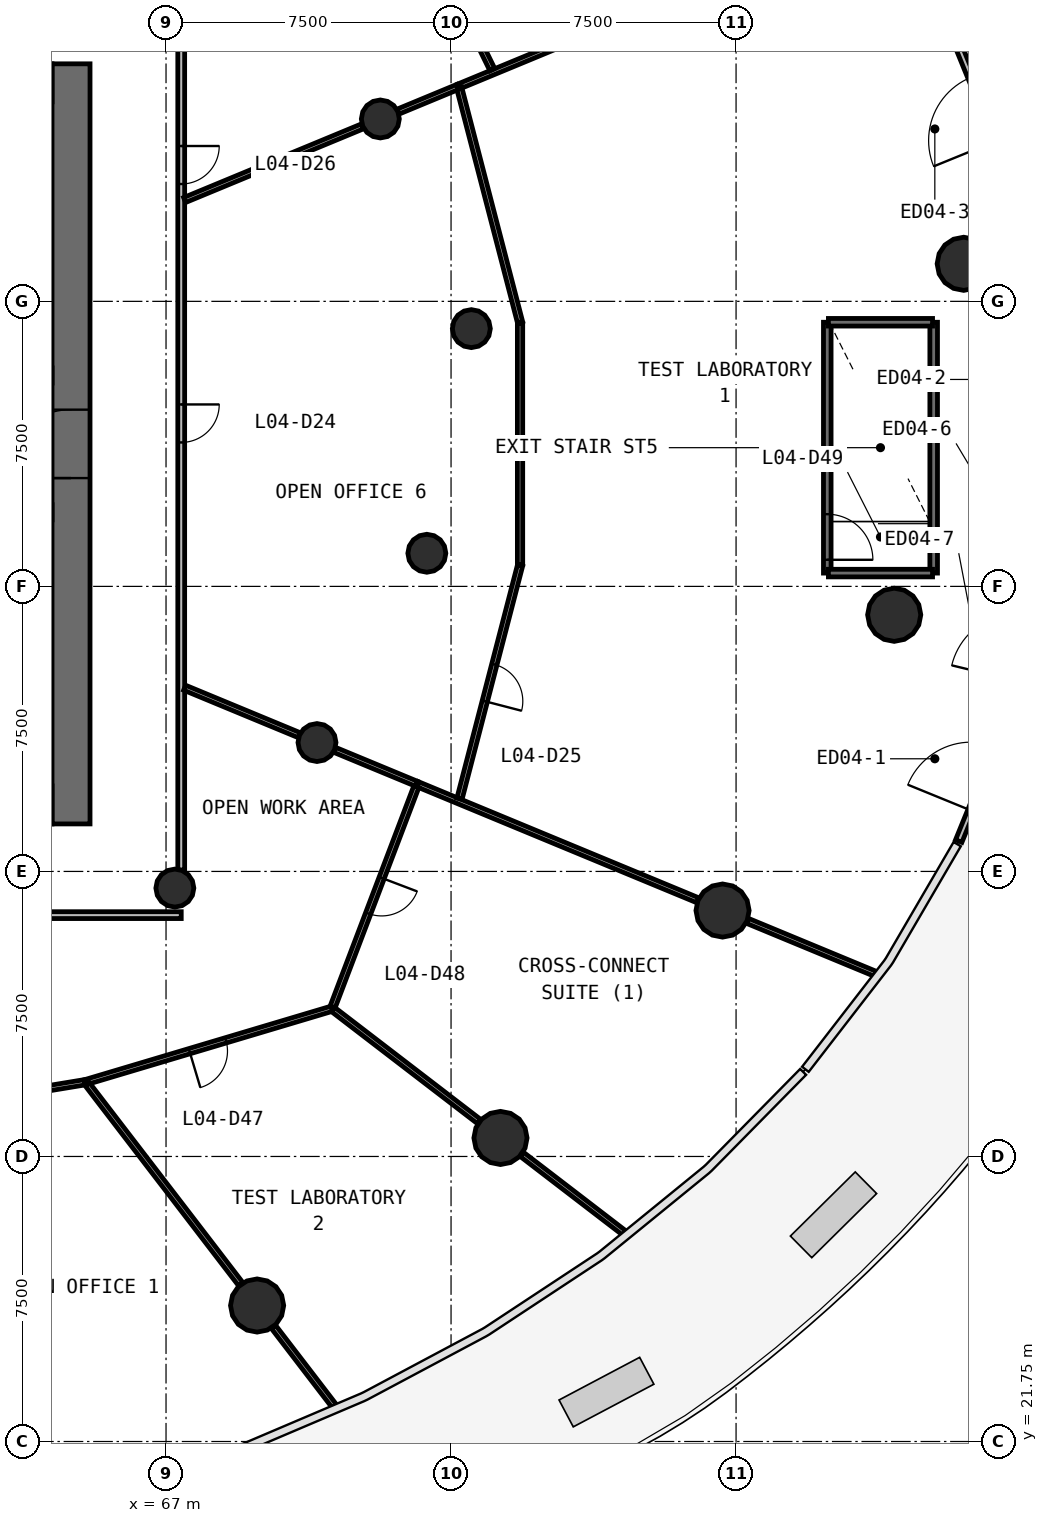
"""IFC4 building model, lengths in metres.
Left out: names, types, materials, properties, quantities, classifications, styles, units other than length and angle.
Written with IfcOpenShell. Run it as: python <this file> out.ifc"""

import sys

from ifc_helpers import new_model, si_unit, direction, frame, frame_2d, origin, origin_2d, place, context, subcontext, project, spatial, rectangle, circle, extrude, source, transform, mapped, element, fill, save


model = new_model("IFC4")
c1 = context("Model", 3, precision=1e-05, world=origin(), true_north=direction((0.0, 1.0)))
c2 = subcontext(c1, "Body", "Model", "MODEL_VIEW")
j1 = project(units=[si_unit("LENGTHUNIT", "METRE"), si_unit("PLANEANGLEUNIT", "RADIAN")], contexts=[c1])
p1 = place(None, origin())
s1 = spatial("IfcSite", under=j1, at=p1, CompositionType="ELEMENT")
p2 = place(p1, origin())
s2 = spatial("IfcBuilding", under=s1, at=p2, CompositionType="ELEMENT")
p3 = place(p2, frame((0.0, 0.0, 18.2)))
s3 = spatial("IfcBuildingStorey", under=s2, at=p3, CompositionType="ELEMENT", Elevation=18.2)
p4 = place(p3, frame((64.5, 38.0, 0.0), z_axis=(0.0, 0.0, 1.0), x_axis=(0.0, 1.0, 0.0)))
e1 = element("IfcWall", 1, at=p4, inside=s3, PredefinedType="SHEAR", context=c2, shape_type="SweptSolid", body=[
    extrude(rectangle(XDim=20.0, YDim=1.0, at=frame_2d((10.0, 0.0))), origin(), (0.0, 0.0, 1.0), 4.4),
])
p5 = place(p4, frame((9.1, 0.0, 0.0)))
e2 = element("IfcOpeningElement", 2, at=p5, cuts=e1, PredefinedType="OPENING", context=c2, shape_type="SweptSolid", body=[
    extrude(rectangle(XDim=1.8, YDim=2.1, at=frame_2d((0.9, 1.05))), frame((0.0, 0.51, 0.0), z_axis=(0.0, -1.0, 0.0), x_axis=(1.0, 0.0, 0.0)), (0.0, 0.0, 1.0), 1.02),
])
m1 = source(origin(), c2, "Body", "SweptSolid", [
    extrude(circle(Radius=0.7, at=origin_2d()), origin(), (0.0, 0.0, 1.0), 4.4),
])
for number, where, z_axis, x_axis in (
    (3, (87.99, 52.738, 0.0), (0.0, 0.0, 1.0), (1.0, 0.0, 0.0)),
    (4, (69.396, 25.328, 0.0), (0.0, 0.0, 1.0), (1.0, 0.0, 0.0)),
    (5, (75.801, 29.737, 0.0), (0.0, 0.0, 1.0), (1.0, 0.0, 0.0)),
    (6, (81.645, 35.721, 0.0), (0.0, 0.0, 1.0), (1.0, 0.0, 0.0)),
    (7, (86.161, 43.503, 0.0), (0.0, 0.0, 1.0), (1.0, 0.0, 0.0)),
):
    element("IfcColumn", number, at=place(p3, frame(where, z_axis=z_axis, x_axis=x_axis)), inside=s3, PredefinedType="COLUMN", context=c2, shape_type="MappedRepresentation", body=[
        mapped(m1, transform((0.0, 0.0, 0.0), scale=1.0)),
    ])
m2 = source(origin(), c2, "Body", "SweptSolid", [
    extrude(circle(Radius=0.5, at=origin_2d()), origin(), (0.0, 0.0, 1.0), 4.4),
])
for number, where, z_axis, x_axis in (
    (8, (75.034, 51.032, 0.0), (0.0, 0.0, 1.0), (1.0, 0.0, 0.0)),
    (9, (72.639, 56.549, 0.0), (0.0, 0.0, 1.0), (1.0, 0.0, 0.0)),
    (10, (67.232, 36.312, 0.0), (0.0, 0.0, 1.0), (1.0, 0.0, 0.0)),
    (11, (70.972, 40.141, 0.0), (0.0, 0.0, 1.0), (1.0, 0.0, 0.0)),
    (12, (73.863, 45.122, 0.0), (0.0, 0.0, 1.0), (1.0, 0.0, 0.0)),
):
    element("IfcColumn", number, at=place(p3, frame(where, z_axis=z_axis, x_axis=x_axis)), inside=s3, PredefinedType="COLUMN", context=c2, shape_type="MappedRepresentation", body=[
        mapped(m2, transform((0.0, 0.0, 0.0), scale=1.0)),
    ])
p6 = place(p3, frame((89.194, 55.178, 0.0), z_axis=(0.0, 0.0, 1.0), x_axis=(-0.377704890436, 0.925926031463, 0.0)))
e13 = element("IfcWall", 13, at=p6, inside=s3, PredefinedType="STANDARD", context=c2, shape_type="SweptSolid", body=[
    extrude(rectangle(XDim=3.535, YDim=0.18, at=frame_2d((1.768, 0.0))), origin(), (0.0, 0.0, 1.0), 3.95),
])
p7 = place(p6, frame((0.867, 0.0, 0.0)))
e14 = element("IfcOpeningElement", 14, at=p7, cuts=e13, PredefinedType="OPENING", context=c2, shape_type="SweptSolid", body=[
    extrude(rectangle(XDim=1.8, YDim=2.4, at=frame_2d((0.9, 1.2))), frame((0.0, 0.1, 0.0), z_axis=(0.0, -1.0, 0.0), x_axis=(1.0, 0.0, 0.0)), (0.0, 0.0, 1.0), 0.2),
])
p8 = place(p3, frame((87.859, 37.549, 0.0), z_axis=(0.0, 0.0, 1.0), x_axis=(0.377704890436, 0.925926031463, 0.0)))
e15 = element("IfcWall", 15, at=p8, inside=s3, PredefinedType="STANDARD", context=c2, shape_type="SweptSolid", body=[
    extrude(rectangle(XDim=3.535, YDim=0.18, at=frame_2d((1.768, 0.0))), origin(), (0.0, 0.0, 1.0), 3.95),
])
p9 = place(p8, frame((0.867, 0.0, 0.0)))
e16 = element("IfcOpeningElement", 16, at=p9, cuts=e15, PredefinedType="OPENING", context=c2, shape_type="SweptSolid", body=[
    extrude(rectangle(XDim=1.8, YDim=2.4, at=frame_2d((0.9, 1.2))), frame((0.0, 0.1, 0.0), z_axis=(0.0, -1.0, 0.0), x_axis=(1.0, 0.0, 0.0)), (0.0, 0.0, 1.0), 0.2),
])
p10 = place(p3, frame((87.2, 44.6, 0.0), z_axis=(0.0, 0.0, 1.0), x_axis=(0.0, 1.0, 0.0)))
e17 = element("IfcWall", 17, at=p10, inside=s3, PredefinedType="SOLIDWALL", context=c2, shape_type="SweptSolid", body=[
    extrude(rectangle(XDim=6.6, YDim=0.2, at=frame_2d((3.3, 0.0))), origin(), (0.0, 0.0, 1.0), 3.95),
])
p11 = place(p3, frame((84.4, 51.2, 0.0), z_axis=(0.0, 0.0, 1.0), x_axis=(0.0, -1.0, 0.0)))
e18 = element("IfcWall", 18, at=p11, inside=s3, PredefinedType="SOLIDWALL", context=c2, shape_type="SweptSolid", body=[
    extrude(rectangle(XDim=6.6, YDim=0.2, at=frame_2d((3.3, 0.0))), origin(), (0.0, 0.0, 1.0), 3.95),
])
p12 = place(p11, frame((5.05, 0.0, 0.0)))
e19 = element("IfcOpeningElement", 19, at=p12, cuts=e18, PredefinedType="OPENING", context=c2, shape_type="SweptSolid", body=[
    extrude(rectangle(XDim=1.2, YDim=2.1, at=frame_2d((0.6, 1.05))), frame((0.0, 0.11, 0.0), z_axis=(0.0, -1.0, 0.0), x_axis=(1.0, 0.0, 0.0)), (0.0, 0.0, 1.0), 0.22),
])
for number, where, z_axis, x_axis in (
    (20, (84.43, 44.6, 0.0), (0.0, 0.0, 1.0), (1.0, 0.0, 0.0)),
    (21, (87.17, 51.2, 0.0), (0.0, 0.0, 1.0), (-1.0, 0.0, 0.0)),
):
    element("IfcWall", number, at=place(p3, frame(where, z_axis=z_axis, x_axis=x_axis)), inside=s3, PredefinedType="SOLIDWALL", context=c2, shape_type="SweptSolid", body=[
        extrude(rectangle(XDim=2.74, YDim=0.2, at=frame_2d((1.37, 0.0))), origin(), (0.0, 0.0, 1.0), 3.95),
    ])
p13 = place(p3, frame((67.4, 35.6, 0.0), z_axis=(0.0, 0.0, 1.0), x_axis=(-1.0, 0.0, 0.0)))
e22 = element("IfcWall", 22, at=p13, inside=s3, PredefinedType="PARTITIONING", context=c2, shape_type="SweptSolid", body=[
    extrude(rectangle(XDim=30.8, YDim=0.18, at=frame_2d((15.4, 0.0))), origin(), (0.0, 0.0, 1.0), 3.15),
])
p14 = place(p13, frame((25.55, 0.0, 0.0)))
e23 = element("IfcOpeningElement", 23, at=p14, cuts=e22, PredefinedType="OPENING", context=c2, shape_type="SweptSolid", body=[
    extrude(rectangle(XDim=1.0, YDim=2.1, at=frame_2d((0.5, 1.05))), frame((0.0, 0.1, 0.0), z_axis=(0.0, -1.0, 0.0), x_axis=(1.0, 0.0, 0.0)), (0.0, 0.0, 1.0), 0.2),
])
p15 = place(p13, frame((14.95, 0.0, 0.0)))
e24 = element("IfcOpeningElement", 24, at=p15, cuts=e22, PredefinedType="OPENING", context=c2, shape_type="SweptSolid", body=[
    extrude(rectangle(XDim=1.0, YDim=2.1, at=frame_2d((0.5, 1.05))), frame((0.0, 0.1, 0.0), z_axis=(0.0, -1.0, 0.0), x_axis=(1.0, 0.0, 0.0)), (0.0, 0.0, 1.0), 0.2),
])
p16 = place(p13, frame((8.95, 0.0, 0.0)))
e25 = element("IfcOpeningElement", 25, at=p16, cuts=e22, PredefinedType="OPENING", context=c2, shape_type="SweptSolid", body=[
    extrude(rectangle(XDim=1.0, YDim=2.1, at=frame_2d((0.5, 1.05))), frame((0.0, 0.1, 0.0), z_axis=(0.0, -1.0, 0.0), x_axis=(1.0, 0.0, 0.0)), (0.0, 0.0, 1.0), 0.2),
])
p17 = place(p3, frame((67.4, 60.37, 0.0), z_axis=(0.0, 0.0, 1.0), x_axis=(0.0, -1.0, 0.0)))
e26 = element("IfcWall", 26, at=p17, inside=s3, PredefinedType="PARTITIONING", context=c2, shape_type="SweptSolid", body=[
    extrude(rectangle(XDim=23.583, YDim=0.18, at=frame_2d((11.791, 0.0))), origin(), (0.0, 0.0, 1.0), 3.15),
])
p18 = place(p17, frame((11.333, 0.0, 0.0)))
e27 = element("IfcOpeningElement", 27, at=p18, cuts=e26, PredefinedType="OPENING", context=c2, shape_type="SweptSolid", body=[
    extrude(rectangle(XDim=1.0, YDim=2.1, at=frame_2d((0.5, 1.05))), frame((0.0, 0.1, 0.0), z_axis=(0.0, -1.0, 0.0), x_axis=(1.0, 0.0, 0.0)), (0.0, 0.0, 1.0), 0.2),
])
p19 = place(p17, frame((4.532, 0.0, 0.0)))
e28 = element("IfcOpeningElement", 28, at=p19, cuts=e26, PredefinedType="OPENING", context=c2, shape_type="SweptSolid", body=[
    extrude(rectangle(XDim=1.0, YDim=2.1, at=frame_2d((0.5, 1.05))), frame((0.0, 0.1, 0.0), z_axis=(0.0, -1.0, 0.0), x_axis=(1.0, 0.0, 0.0)), (0.0, 0.0, 1.0), 0.2),
])
p20 = place(p3, frame((74.704, 57.404, 0.0), z_axis=(0.0, 0.0, 1.0), x_axis=(0.923875564014, 0.382693013024, 0.0)))
e29 = element("IfcWall", 29, at=p20, inside=s3, PredefinedType="PARTITIONING", context=c2, shape_type="SweptSolid", body=[
    extrude(rectangle(XDim=9.626, YDim=0.14, at=frame_2d((4.813, 0.0))), origin(), (0.0, 0.0, 1.0), 3.15),
])
p21 = place(p3, frame((73.613, 39.048, 0.0), z_axis=(0.0, 0.0, 1.0), x_axis=(0.923869702123, -0.382707164159, 0.0)))
e30 = element("IfcWall", 30, at=p21, inside=s3, PredefinedType="PARTITIONING", context=c2, shape_type="SweptSolid", body=[
    extrude(rectangle(XDim=7.989, YDim=0.14, at=frame_2d((3.994, 0.0))), origin(), (0.0, 0.0, 1.0), 3.15),
])
p22 = place(p3, frame((71.367, 33.139, 0.0), z_axis=(0.0, 0.0, 1.0), x_axis=(-0.958287066923, -0.285807448063, 0.0)))
e31 = element("IfcWall", 31, at=p22, inside=s3, PredefinedType="PARTITIONING", context=c2, shape_type="SweptSolid", body=[
    extrude(rectangle(XDim=6.763, YDim=0.14, at=frame_2d((3.381, 0.0))), origin(), (0.0, 0.0, 1.0), 3.15),
])
p23 = place(p22, frame((2.913, 0.0, 0.0)))
e32 = element("IfcOpeningElement", 32, at=p23, cuts=e31, PredefinedType="OPENING", context=c2, shape_type="SweptSolid", body=[
    extrude(rectangle(XDim=1.0, YDim=2.1, at=frame_2d((0.5, 1.05))), frame((0.0, 0.08, 0.0), z_axis=(0.0, -1.0, 0.0), x_axis=(1.0, 0.0, 0.0)), (0.0, 0.0, 1.0), 0.16),
])
p24 = place(p3, frame((72.66, 63.816, 0.0), z_axis=(0.0, 0.0, 1.0), x_axis=(0.44010555344, -0.897946046169, 0.0)))
e33 = element("IfcWall", 33, at=p24, inside=s3, PredefinedType="PARTITIONING", context=c2, shape_type="SweptSolid", body=[
    extrude(rectangle(XDim=6.649, YDim=0.14, at=frame_2d((3.324, 0.0))), origin(), (0.0, 0.0, 1.0), 3.15),
])
p25 = place(p24, frame((2.799, 0.0, 0.0)))
e34 = element("IfcOpeningElement", 34, at=p25, cuts=e33, PredefinedType="OPENING", context=c2, shape_type="SweptSolid", body=[
    extrude(rectangle(XDim=1.0, YDim=2.1, at=frame_2d((0.5, 1.05))), frame((0.0, 0.08, 0.0), z_axis=(0.0, -1.0, 0.0), x_axis=(1.0, 0.0, 0.0)), (0.0, 0.0, 1.0), 0.16),
])
p26 = place(p3, frame((64.932, 31.147, 0.0), z_axis=(0.0, 0.0, 1.0), x_axis=(0.608760039418, -0.79335440656, 0.0)))
e35 = element("IfcWall", 35, at=p26, inside=s3, PredefinedType="PARTITIONING", context=c2, shape_type="SweptSolid", body=[
    extrude(rectangle(XDim=6.63, YDim=0.14, at=frame_2d((3.315, 0.0))), origin(), (0.0, 0.0, 1.0), 3.15),
])
p27 = place(p3, frame((76.316, 51.201, 0.0), z_axis=(0.0, 0.0, 1.0), x_axis=(-0.251404417417, 0.967882130687, 0.0)))
e36 = element("IfcWall", 36, at=p27, inside=s3, PredefinedType="PARTITIONING", context=c2, shape_type="SweptSolid", body=[
    extrude(rectangle(XDim=6.379, YDim=0.14, at=frame_2d((3.189, 0.0))), origin(), (0.0, 0.0, 1.0), 3.15),
])
p28 = place(p3, frame((76.316, 44.799, 0.0), z_axis=(0.0, 0.0, 1.0), x_axis=(-0.251407268144, -0.967881390215, 0.0)))
e37 = element("IfcWall", 37, at=p28, inside=s3, PredefinedType="PARTITIONING", context=c2, shape_type="SweptSolid", body=[
    extrude(rectangle(XDim=6.338, YDim=0.14, at=frame_2d((3.169, 0.0))), origin(), (0.0, 0.0, 1.0), 3.15),
])
p29 = place(p28, frame((2.688, 0.0, 0.0)))
e38 = element("IfcOpeningElement", 38, at=p29, cuts=e37, PredefinedType="OPENING", context=c2, shape_type="SweptSolid", body=[
    extrude(rectangle(XDim=1.0, YDim=2.1, at=frame_2d((0.5, 1.05))), frame((0.0, 0.08, 0.0), z_axis=(0.0, -1.0, 0.0), x_axis=(1.0, 0.0, 0.0)), (0.0, 0.0, 1.0), 0.16),
])
p30 = place(p3, frame((76.316, 44.829, 0.0), z_axis=(0.0, 0.0, 1.0), x_axis=(0.0, 1.0, 0.0)))
e39 = element("IfcWall", 39, at=p30, inside=s3, PredefinedType="PARTITIONING", context=c2, shape_type="SweptSolid", body=[
    extrude(rectangle(XDim=6.342, YDim=0.14, at=frame_2d((3.171, 0.0))), origin(), (0.0, 0.0, 1.0), 3.15),
])
p31 = place(p3, frame((73.588, 38.982, 0.0), z_axis=(0.0, 0.0, 1.0), x_axis=(-0.355244508987, -0.934773415772, 0.0)))
e40 = element("IfcWall", 40, at=p31, inside=s3, PredefinedType="PARTITIONING", context=c2, shape_type="SweptSolid", body=[
    extrude(rectangle(XDim=6.221, YDim=0.14, at=frame_2d((3.11, 0.0))), origin(), (0.0, 0.0, 1.0), 3.15),
])
p32 = place(p31, frame((2.571, 0.0, 0.0)))
e41 = element("IfcOpeningElement", 41, at=p32, cuts=e40, PredefinedType="OPENING", context=c2, shape_type="SweptSolid", body=[
    extrude(rectangle(XDim=1.0, YDim=2.1, at=frame_2d((0.5, 1.05))), frame((0.0, 0.08, 0.0), z_axis=(0.0, -1.0, 0.0), x_axis=(1.0, 0.0, 0.0)), (0.0, 0.0, 1.0), 0.16),
])
p33 = place(p3, frame((64.857, 31.201, 0.0), z_axis=(0.0, 0.0, 1.0), x_axis=(-0.986684787107, -0.162644184928, 0.0)))
e42 = element("IfcWall", 42, at=p33, inside=s3, PredefinedType="PARTITIONING", context=c2, shape_type="SweptSolid", body=[
    extrude(rectangle(XDim=5.596, YDim=0.14, at=frame_2d((2.798, 0.0))), origin(), (0.0, 0.0, 1.0), 3.15),
])
p34 = place(p33, frame((2.346, 0.0, 0.0)))
e43 = element("IfcOpeningElement", 43, at=p34, cuts=e42, PredefinedType="OPENING", context=c2, shape_type="SweptSolid", body=[
    extrude(rectangle(XDim=1.0, YDim=2.1, at=frame_2d((0.5, 1.05))), frame((0.0, 0.08, 0.0), z_axis=(0.0, -1.0, 0.0), x_axis=(1.0, 0.0, 0.0)), (0.0, 0.0, 1.0), 0.16),
])
p35 = place(p3, frame((67.49, 54.416, 0.0), z_axis=(0.0, 0.0, 1.0), x_axis=(0.923890025086, 0.382658100067, 0.0)))
e44 = element("IfcWall", 44, at=p35, inside=s3, PredefinedType="PARTITIONING", context=c2, shape_type="SweptSolid", body=[
    extrude(rectangle(XDim=5.068, YDim=0.14, at=frame_2d((2.534, 0.0))), origin(), (0.0, 0.0, 1.0), 3.15),
])
p36 = place(p3, frame((71.391, 33.121, 0.0), z_axis=(0.0, 0.0, 1.0), x_axis=(0.79336750658, -0.608742966697, 0.0)))
e45 = element("IfcWall", 45, at=p36, inside=s3, PredefinedType="PARTITIONING", context=c2, shape_type="SweptSolid", body=[
    extrude(rectangle(XDim=4.854, YDim=0.14, at=frame_2d((2.427, 0.0))), origin(), (0.0, 0.0, 1.0), 3.15),
])
p37 = place(p3, frame((82.296, 35.451, 0.0), z_axis=(0.0, 0.0, 1.0), x_axis=(0.923882033439, -0.382677394537, 0.0)))
e46 = element("IfcWall", 46, at=p37, inside=s3, PredefinedType="PARTITIONING", context=c2, shape_type="SweptSolid", body=[
    extrude(rectangle(XDim=3.642, YDim=0.14, at=frame_2d((1.821, 0.0))), origin(), (0.0, 0.0, 1.0), 3.15),
])
p38 = place(p3, frame((71.439, 39.948, 0.0), z_axis=(0.0, 0.0, 1.0), x_axis=(0.923861804277, -0.382726229306, 0.0)))
e47 = element("IfcWall", 47, at=p38, inside=s3, PredefinedType="PARTITIONING", context=c2, shape_type="SweptSolid", body=[
    extrude(rectangle(XDim=2.323, YDim=0.14, at=frame_2d((1.161, 0.0))), origin(), (0.0, 0.0, 1.0), 3.15),
])
p39 = place(p3, frame((76.359, 29.309, 0.0), z_axis=(0.0, 0.0, 1.0), x_axis=(0.793324630829, -0.608798842082, 0.0)))
e48 = element("IfcWall", 48, at=p39, inside=s3, PredefinedType="PARTITIONING", context=c2, shape_type="SweptSolid", body=[
    extrude(rectangle(XDim=3.404, YDim=0.14, at=frame_2d((1.702, 0.0))), origin(), (0.0, 0.0, 1.0), 3.15),
])
p40 = place(p3, frame((67.49, 41.584, 0.0), z_axis=(0.0, 0.0, 1.0), x_axis=(0.923911109142, -0.382607190737, 0.0)))
e49 = element("IfcWall", 49, at=p40, inside=s3, PredefinedType="PARTITIONING", context=c2, shape_type="SweptSolid", body=[
    extrude(rectangle(XDim=3.264, YDim=0.14, at=frame_2d((1.632, 0.0))), origin(), (0.0, 0.0, 1.0), 3.15),
])
p41 = place(p3, frame((73.106, 56.742, 0.0), z_axis=(0.0, 0.0, 1.0), x_axis=(0.923810256597, 0.38285063642, 0.0)))
e50 = element("IfcWall", 50, at=p41, inside=s3, PredefinedType="PARTITIONING", context=c2, shape_type="SweptSolid", body=[
    extrude(rectangle(XDim=1.7, YDim=0.14, at=frame_2d((0.85, 0.0))), origin(), (0.0, 0.0, 1.0), 3.15),
])
p42 = place(p3, frame((69.825, 24.77, 0.0), z_axis=(0.0, 0.0, 1.0), x_axis=(0.608811983243, -0.793314546104, 0.0)))
e51 = element("IfcWall", 51, at=p42, inside=s3, PredefinedType="PARTITIONING", context=c2, shape_type="SweptSolid", body=[
    extrude(rectangle(XDim=2.627, YDim=0.14, at=frame_2d((1.313, 0.0))), origin(), (0.0, 0.0, 1.0), 3.15),
])
m3 = source(origin(), c2, "Body", "SweptSolid", [
    extrude(rectangle(XDim=1.8, YDim=2.1, at=frame_2d((0.9, 1.05))), frame((0.0, 0.025, 0.0), z_axis=(0.0, -1.0, 0.0), x_axis=(1.0, 0.0, 0.0)), (0.0, 0.0, 1.0), 0.05),
])
p43 = place(p5, origin())
e52 = element("IfcDoor", 52, at=p43, inside=s3, OperationType="SINGLE_SWING_LEFT", PredefinedType="DOOR", context=c2, shape_type="MappedRepresentation", body=[
    mapped(m3, transform((0.0, 0.0, 0.0), scale=1.0)),
])
fill(e2, e52)
m4 = source(origin(), c2, "Body", "SweptSolid", [
    extrude(rectangle(XDim=1.0, YDim=2.1, at=frame_2d((0.5, 1.05))), frame((0.0, 0.025, 0.0), z_axis=(0.0, -1.0, 0.0), x_axis=(1.0, 0.0, 0.0)), (0.0, 0.0, 1.0), 0.05),
])
p44 = place(p18, origin())
e53 = element("IfcDoor", 53, at=p44, inside=s3, OperationType="SINGLE_SWING_LEFT", PredefinedType="DOOR", context=c2, shape_type="MappedRepresentation", body=[
    mapped(m4, transform((0.0, 0.0, 0.0), scale=1.0)),
])
fill(e27, e53)
p45 = place(p29, origin())
e54 = element("IfcDoor", 54, at=p45, inside=s3, OperationType="SINGLE_SWING_RIGHT", PredefinedType="DOOR", context=c2, shape_type="MappedRepresentation", body=[
    mapped(m4, transform((0.0, 0.0, 0.0), scale=1.0)),
])
fill(e38, e54)
p46 = place(p19, origin())
e55 = element("IfcDoor", 55, at=p46, inside=s3, OperationType="SINGLE_SWING_LEFT", PredefinedType="DOOR", context=c2, shape_type="MappedRepresentation", body=[
    mapped(m4, transform((0.0, 0.0, 0.0), scale=1.0)),
])
fill(e28, e55)
p47 = place(p23, origin())
e56 = element("IfcDoor", 56, at=p47, inside=s3, OperationType="SINGLE_SWING_RIGHT", PredefinedType="DOOR", context=c2, shape_type="MappedRepresentation", body=[
    mapped(m4, transform((0.0, 0.0, 0.0), scale=1.0)),
])
fill(e32, e56)
p48 = place(p32, origin())
e57 = element("IfcDoor", 57, at=p48, inside=s3, OperationType="SINGLE_SWING_LEFT", PredefinedType="DOOR", context=c2, shape_type="MappedRepresentation", body=[
    mapped(m4, transform((0.0, 0.0, 0.0), scale=1.0)),
])
fill(e41, e57)
m5 = source(origin(), c2, "Body", "SweptSolid", [
    extrude(rectangle(XDim=1.2, YDim=2.1, at=frame_2d((0.6, 1.05))), frame((0.0, 0.025, 0.0), z_axis=(0.0, -1.0, 0.0), x_axis=(1.0, 0.0, 0.0)), (0.0, 0.0, 1.0), 0.05),
])
p49 = place(p12, origin())
e58 = element("IfcDoor", 58, at=p49, inside=s3, OperationType="SINGLE_SWING_RIGHT", PredefinedType="DOOR", context=c2, shape_type="MappedRepresentation", body=[
    mapped(m5, transform((0.0, 0.0, 0.0), scale=1.0)),
])
fill(e19, e58)
save(model, sys.argv[1])
